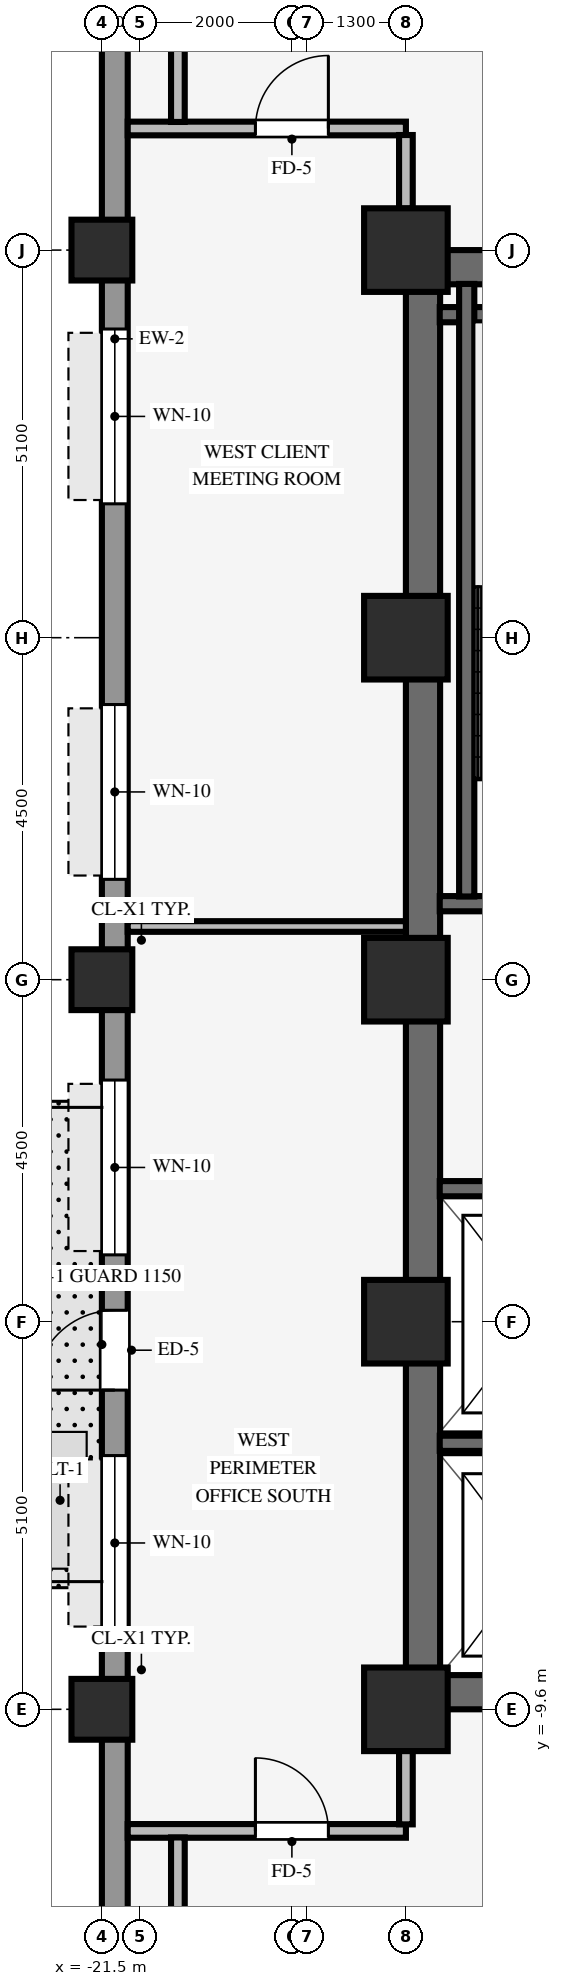
"""IFC4 building model, lengths in metres.
Left out: names, types, materials, properties, quantities, classifications, styles, units other than length and angle.
Written with IfcOpenShell. Run it as: python <this file> out.ifc"""

import sys

from ifc_helpers import new_model, si_unit, direction, frame, frame_2d, origin, origin_2d, place, context, subcontext, project, spatial, rectangle, hollow_rectangle, extrude, source, transform, mapped, element, fill, save


model = new_model("IFC4")
c1 = context("Model", 3, precision=1e-05, world=origin(), true_north=direction((0.0, 1.0)))
c2 = subcontext(c1, "Body", "Model", "MODEL_VIEW")
j1 = project(units=[si_unit("LENGTHUNIT", "METRE"), si_unit("PLANEANGLEUNIT", "RADIAN")], contexts=[c1])
p1 = place(None, origin())
s1 = spatial("IfcSite", under=j1, at=p1, CompositionType="ELEMENT")
p2 = place(p1, origin())
s2 = spatial("IfcBuilding", under=s1, at=p2, CompositionType="ELEMENT")
p3 = place(p2, frame((0.0, 0.0, 78.7)))
s3 = spatial("IfcBuildingStorey", under=s2, at=p3, CompositionType="ELEMENT", Elevation=78.7)
for number, where, z_axis, x_axis in (
    (1, (-17.5, -9.375, 0.0), (0.0, 0.0, 1.0), (1.0, 0.0, 0.0)),
    (2, (-17.5, 9.375, 0.0), (0.0, 0.0, 1.0), (1.0, 0.0, 0.0)),
):
    element("IfcWall", number, at=place(p3, frame(where, z_axis=z_axis, x_axis=x_axis)), inside=s3, PredefinedType="SHEAR", context=c2, shape_type="SweptSolid", body=[
        extrude(rectangle(XDim=8.5, YDim=0.45, at=frame_2d((4.25, 0.0))), origin(), (0.0, 0.0, 1.0), 3.37),
    ])
p4 = place(p3, frame((-17.275, -9.155, 0.0), z_axis=(0.0, 0.0, 1.0), x_axis=(0.0, 1.0, 0.0)))
e3 = element("IfcWall", 3, at=p4, inside=s3, PredefinedType="SHEAR", context=c2, shape_type="SweptSolid", body=[
    extrude(rectangle(XDim=18.31, YDim=0.45, at=frame_2d((9.155, 0.0))), origin(), (0.0, 0.0, 1.0), 3.37),
])
for number, where, z_axis, x_axis in (
    (4, (-17.5, -9.6, 0.0), (0.0, 0.0, 1.0), (1.0, 0.0, 0.0)),
    (5, (-17.5, -4.5, 0.0), (0.0, 0.0, 1.0), (1.0, 0.0, 0.0)),
    (6, (-17.5, 4.5, 0.0), (0.0, 0.0, 1.0), (1.0, 0.0, 0.0)),
    (7, (-17.5, 9.6, 0.0), (0.0, 0.0, 1.0), (1.0, 0.0, 0.0)),
    (8, (-17.5, 0.0, 0.0), (0.0, 0.0, 1.0), (1.0, 0.0, 0.0)),
):
    element("IfcColumn", number, at=place(p3, frame(where, z_axis=z_axis, x_axis=x_axis)), inside=s3, PredefinedType="COLUMN", context=c2, shape_type="SweptSolid", body=[
        extrude(rectangle(XDim=1.1, YDim=1.1, at=origin_2d()), origin(), (0.0, 0.0, 1.0), 3.37),
    ])
for number, where, z_axis, x_axis in (
    (9, (-21.5, -9.6, 0.0), (0.0, 0.0, 1.0), (1.0, 0.0, 0.0)),
    (10, (-21.5, 0.0, 0.0), (0.0, 0.0, 1.0), (1.0, 0.0, 0.0)),
    (11, (-21.5, 9.6, 0.0), (0.0, 0.0, 1.0), (1.0, 0.0, 0.0)),
):
    element("IfcColumn", number, at=place(p3, frame(where, z_axis=z_axis, x_axis=x_axis)), inside=s3, PredefinedType="COLUMN", context=c2, shape_type="SweptSolid", body=[
        extrude(hollow_rectangle(XDim=0.8, YDim=0.8, WallThickness=0.055, InnerFilletRadius=0.055, OuterFilletRadius=0.11, at=origin_2d()), origin(), (0.0, 0.0, 1.0), 3.37),
    ])
p5 = place(p3, frame((-21.33, -20.764, 0.0), z_axis=(0.0, 0.0, 1.0), x_axis=(0.0, 1.0, 0.0)))
e12 = element("IfcWall", 12, at=p5, inside=s3, PredefinedType="STANDARD", context=c2, shape_type="SweptSolid", body=[
    extrude(rectangle(XDim=41.528, YDim=0.34, at=frame_2d((20.764, 0.0))), origin(), (0.0, 0.0, 1.0), 2.705),
])
p6 = place(p5, frame((15.364, 0.0, 0.0)))
e13 = element("IfcOpeningElement", 13, at=p6, cuts=e12, PredefinedType="OPENING", context=c2, shape_type="SweptSolid", body=[
    extrude(rectangle(XDim=1.05, YDim=2.1, at=frame_2d((0.525, 1.05))), frame((0.0, 0.18, 0.0), z_axis=(0.0, -1.0, 0.0), x_axis=(1.0, 0.0, 0.0)), (0.0, 0.0, 1.0), 0.36),
])
p7 = place(p5, frame((12.202, 0.0, 0.8)))
e14 = element("IfcOpeningElement", 14, at=p7, cuts=e12, PredefinedType="OPENING", context=c2, shape_type="SweptSolid", body=[
    extrude(rectangle(XDim=2.3, YDim=1.62, at=frame_2d((1.15, 0.81))), frame((0.0, 0.18, 0.0), z_axis=(0.0, -1.0, 0.0), x_axis=(1.0, 0.0, 0.0)), (0.0, 0.0, 1.0), 0.36),
])
p8 = place(p5, frame((17.144, 0.0, 0.8)))
e15 = element("IfcOpeningElement", 15, at=p8, cuts=e12, PredefinedType="OPENING", context=c2, shape_type="SweptSolid", body=[
    extrude(rectangle(XDim=2.3, YDim=1.62, at=frame_2d((1.15, 0.81))), frame((0.0, 0.18, 0.0), z_axis=(0.0, -1.0, 0.0), x_axis=(1.0, 0.0, 0.0)), (0.0, 0.0, 1.0), 0.36),
])
p9 = place(p5, frame((22.084, 0.0, 0.8)))
e16 = element("IfcOpeningElement", 16, at=p9, cuts=e12, PredefinedType="OPENING", context=c2, shape_type="SweptSolid", body=[
    extrude(rectangle(XDim=2.3, YDim=1.62, at=frame_2d((1.15, 0.81))), frame((0.0, 0.18, 0.0), z_axis=(0.0, -1.0, 0.0), x_axis=(1.0, 0.0, 0.0)), (0.0, 0.0, 1.0), 0.36),
])
p10 = place(p5, frame((27.025, 0.0, 0.8)))
e17 = element("IfcOpeningElement", 17, at=p10, cuts=e12, PredefinedType="OPENING", context=c2, shape_type="SweptSolid", body=[
    extrude(rectangle(XDim=2.3, YDim=1.62, at=frame_2d((1.15, 0.81))), frame((0.0, 0.18, 0.0), z_axis=(0.0, -1.0, 0.0), x_axis=(1.0, 0.0, 0.0)), (0.0, 0.0, 1.0), 0.36),
])
for number, where, z_axis, x_axis in (
    (18, (-17.055, 1.0, 0.0), (0.0, 0.0, 1.0), (1.0, 0.0, 0.0)),
    (19, (-17.055, 8.75, 0.0), (0.0, 0.0, 1.0), (1.0, 0.0, 0.0)),
):
    element("IfcWall", number, at=place(p3, frame(where, z_axis=z_axis, x_axis=x_axis)), inside=s3, PredefinedType="SHEAR", context=c2, shape_type="SweptSolid", body=[
        extrude(rectangle(XDim=3.52, YDim=0.2, at=frame_2d((1.76, 0.0))), origin(), (0.0, 0.0, 1.0), 3.37),
    ])
p11 = place(p3, frame((-16.7, 1.095, 0.0), z_axis=(0.0, 0.0, 1.0), x_axis=(0.0, 1.0, 0.0)))
e20 = element("IfcWall", 20, at=p11, inside=s3, PredefinedType="SHEAR", context=c2, shape_type="SweptSolid", body=[
    extrude(rectangle(XDim=8.06, YDim=0.2, at=frame_2d((4.03, 0.0))), origin(), (0.0, 0.0, 1.0), 3.37),
])
p12 = place(p3, frame((-17.055, -6.1, 0.0), z_axis=(0.0, 0.0, 1.0), x_axis=(1.0, 0.0, 0.0)))
e21 = element("IfcWall", 21, at=p12, inside=s3, PredefinedType="SHEAR", context=c2, shape_type="SweptSolid", body=[
    extrude(rectangle(XDim=2.805, YDim=0.2, at=frame_2d((1.402, 0.0))), origin(), (0.0, 0.0, 1.0), 3.37),
])
p13 = place(p3, frame((-17.055, -2.75, 0.0), z_axis=(0.0, 0.0, 1.0), x_axis=(1.0, 0.0, 0.0)))
e22 = element("IfcWall", 22, at=p13, inside=s3, PredefinedType="SHEAR", context=c2, shape_type="SweptSolid", body=[
    extrude(rectangle(XDim=2.61, YDim=0.2, at=frame_2d((1.305, 0.0))), origin(), (0.0, 0.0, 1.0), 3.37),
])
p14 = place(p3, frame((-21.16, -11.2, 0.0), z_axis=(0.0, 0.0, 1.0), x_axis=(1.0, 0.0, 0.0)))
e23 = element("IfcWall", 23, at=p14, inside=s3, PredefinedType="PARTITIONING", context=c2, shape_type="SweptSolid", body=[
    extrude(rectangle(XDim=3.66, YDim=0.18, at=frame_2d((1.83, 0.0))), origin(), (0.0, 0.0, 1.0), 3.36),
])
p15 = place(p14, frame((1.68, 0.0, 0.0)))
e24 = element("IfcOpeningElement", 24, at=p15, cuts=e23, PredefinedType="OPENING", context=c2, shape_type="SweptSolid", body=[
    extrude(rectangle(XDim=0.96, YDim=2.1, at=frame_2d((0.48, 1.05))), frame((0.0, 0.1, 0.0), z_axis=(0.0, -1.0, 0.0), x_axis=(1.0, 0.0, 0.0)), (0.0, 0.0, 1.0), 0.2),
])
p16 = place(p3, frame((-21.16, 0.7, 0.0), z_axis=(0.0, 0.0, 1.0), x_axis=(1.0, 0.0, 0.0)))
e25 = element("IfcWall", 25, at=p16, inside=s3, PredefinedType="PARTITIONING", context=c2, shape_type="SweptSolid", body=[
    extrude(rectangle(XDim=3.66, YDim=0.14, at=frame_2d((1.83, 0.0))), origin(), (0.0, 0.0, 1.0), 3.36),
])
p17 = place(p3, frame((-21.16, 11.2, 0.0), z_axis=(0.0, 0.0, 1.0), x_axis=(1.0, 0.0, 0.0)))
e26 = element("IfcWall", 26, at=p17, inside=s3, PredefinedType="PARTITIONING", context=c2, shape_type="SweptSolid", body=[
    extrude(rectangle(XDim=3.66, YDim=0.18, at=frame_2d((1.83, 0.0))), origin(), (0.0, 0.0, 1.0), 3.36),
])
p18 = place(p17, frame((1.68, 0.0, 0.0)))
e27 = element("IfcOpeningElement", 27, at=p18, cuts=e26, PredefinedType="OPENING", context=c2, shape_type="SweptSolid", body=[
    extrude(rectangle(XDim=0.96, YDim=2.1, at=frame_2d((0.48, 1.05))), frame((0.0, 0.1, 0.0), z_axis=(0.0, -1.0, 0.0), x_axis=(1.0, 0.0, 0.0)), (0.0, 0.0, 1.0), 0.2),
])
for number, where, z_axis, x_axis in (
    (28, (-20.5, -13.514, 0.0), (0.0, 0.0, 1.0), (0.0, 1.0, 0.0)),
    (29, (-20.5, 11.286, 0.0), (0.0, 0.0, 1.0), (0.0, 1.0, 0.0)),
):
    element("IfcWall", number, at=place(p3, frame(where, z_axis=z_axis, x_axis=x_axis)), inside=s3, PredefinedType="PARTITIONING", context=c2, shape_type="SweptSolid", body=[
        extrude(rectangle(XDim=2.228, YDim=0.18, at=frame_2d((1.114, 0.0))), origin(), (0.0, 0.0, 1.0), 3.36),
    ])
for number, where, z_axis, x_axis in (
    (30, (-17.5, -11.114, 0.0), (0.0, 0.0, 1.0), (0.0, 1.0, 0.0)),
    (31, (-17.5, 10.146, 0.0), (0.0, 0.0, 1.0), (0.0, 1.0, 0.0)),
):
    element("IfcWall", number, at=place(p3, frame(where, z_axis=z_axis, x_axis=x_axis)), inside=s3, PredefinedType="PARTITIONING", context=c2, shape_type="SweptSolid", body=[
        extrude(rectangle(XDim=0.968, YDim=0.18, at=frame_2d((0.484, 0.0))), origin(), (0.0, 0.0, 1.0), 2.738),
    ])
m1 = source(origin(), c2, "Body", "SweptSolid", [
    extrude(rectangle(XDim=1.05, YDim=2.1, at=frame_2d((0.525, 1.05))), frame((0.0, 0.025, 0.0), z_axis=(0.0, -1.0, 0.0), x_axis=(1.0, 0.0, 0.0)), (0.0, 0.0, 1.0), 0.05),
])
p19 = place(p6, origin())
e32 = element("IfcDoor", 32, at=p19, inside=s3, OperationType="SINGLE_SWING_LEFT", PredefinedType="DOOR", context=c2, shape_type="MappedRepresentation", body=[
    mapped(m1, transform((0.0, 0.0, 0.0), scale=1.0)),
])
fill(e13, e32)
m2 = source(origin(), c2, "Body", "SweptSolid", [
    extrude(rectangle(XDim=2.3, YDim=1.62, at=frame_2d((1.15, 0.81))), frame((0.0, 0.03, 0.0), z_axis=(0.0, -1.0, 0.0), x_axis=(1.0, 0.0, 0.0)), (0.0, 0.0, 1.0), 0.06),
])
p20 = place(p7, origin())
e33 = element("IfcWindow", 33, at=p20, inside=s3, PartitioningType="SINGLE_PANEL", PredefinedType="WINDOW", context=c2, shape_type="MappedRepresentation", body=[
    mapped(m2, transform((0.0, 0.0, 0.0), scale=1.0)),
])
fill(e14, e33)
p21 = place(p8, origin())
e34 = element("IfcWindow", 34, at=p21, inside=s3, PartitioningType="SINGLE_PANEL", PredefinedType="WINDOW", context=c2, shape_type="MappedRepresentation", body=[
    mapped(m2, transform((0.0, 0.0, 0.0), scale=1.0)),
])
fill(e15, e34)
p22 = place(p9, origin())
e35 = element("IfcWindow", 35, at=p22, inside=s3, PartitioningType="SINGLE_PANEL", PredefinedType="WINDOW", context=c2, shape_type="MappedRepresentation", body=[
    mapped(m2, transform((0.0, 0.0, 0.0), scale=1.0)),
])
fill(e16, e35)
p23 = place(p10, origin())
e36 = element("IfcWindow", 36, at=p23, inside=s3, PartitioningType="SINGLE_PANEL", PredefinedType="WINDOW", context=c2, shape_type="MappedRepresentation", body=[
    mapped(m2, transform((0.0, 0.0, 0.0), scale=1.0)),
])
fill(e17, e36)
m3 = source(origin(), c2, "Body", "SweptSolid", [
    extrude(rectangle(XDim=0.96, YDim=2.1, at=frame_2d((0.48, 1.05))), frame((0.0, 0.025, 0.0), z_axis=(0.0, -1.0, 0.0), x_axis=(1.0, 0.0, 0.0)), (0.0, 0.0, 1.0), 0.05),
])
p24 = place(p15, origin())
e37 = element("IfcDoor", 37, at=p24, inside=s3, OperationType="SINGLE_SWING_LEFT", PredefinedType="DOOR", context=c2, shape_type="MappedRepresentation", body=[
    mapped(m3, transform((0.0, 0.0, 0.0), scale=1.0)),
])
fill(e24, e37)
p25 = place(p18, origin())
e38 = element("IfcDoor", 38, at=p25, inside=s3, OperationType="SINGLE_SWING_RIGHT", PredefinedType="DOOR", context=c2, shape_type="MappedRepresentation", body=[
    mapped(m3, transform((0.0, 0.0, 0.0), scale=1.0)),
])
fill(e27, e38)
save(model, sys.argv[1])
